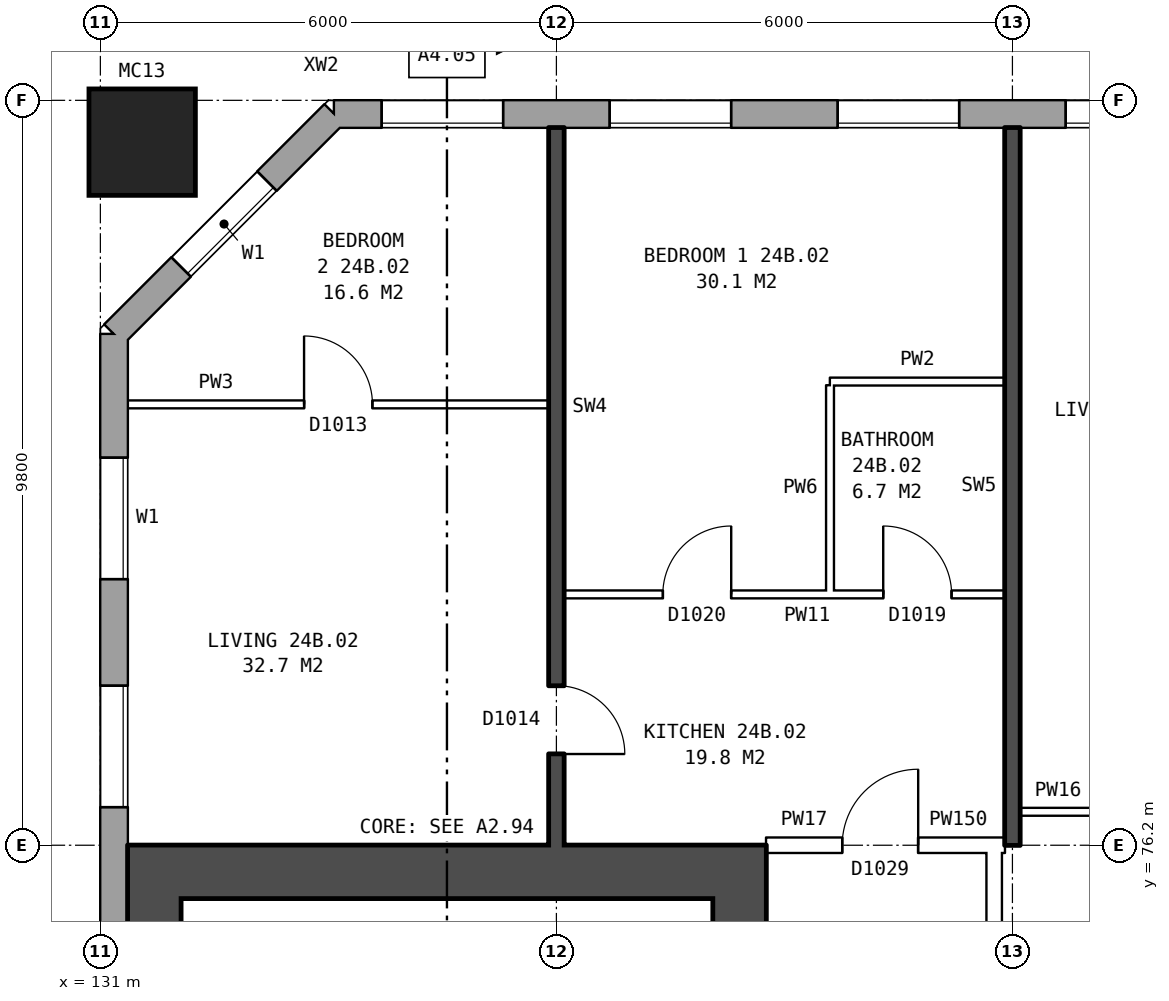
"""IFC4 building model, lengths in metres.
Left out: names, types, materials, properties, quantities, classifications, styles, units other than length and angle.
Written with IfcOpenShell. Run it as: python <this file> out.ifc"""

import sys

from ifc_helpers import new_model, si_unit, direction, frame, frame_2d, origin, origin_2d, place, context, subcontext, project, spatial, rectangle, hollow_rectangle, extrude, element, fill, save


model = new_model("IFC4")
c1 = context("Model", 3, precision=1e-05, world=origin(), true_north=direction((0.0, 1.0)))
c2 = subcontext(c1, "Body", "Model", "MODEL_VIEW")
j1 = project(units=[si_unit("LENGTHUNIT", "METRE"), si_unit("PLANEANGLEUNIT", "RADIAN")], contexts=[c1])
p1 = place(None, origin())
s1 = spatial("IfcSite", under=j1, at=p1, CompositionType="ELEMENT")
p2 = place(p1, origin())
s2 = spatial("IfcBuilding", under=s1, at=p2, CompositionType="ELEMENT")
p3 = place(p2, frame((0.0, 0.0, 87.1)))
s3 = spatial("IfcBuildingStorey", under=s2, at=p3, CompositionType="ELEMENT", Elevation=87.1)
p4 = place(p3, frame((131.55, 85.45, 0.0), z_axis=(0.0, 0.0, 1.0), x_axis=(1.0, 0.0, 0.0)))
e1 = element("IfcColumn", 1, at=p4, inside=s3, PredefinedType="COLUMN", context=c2, shape_type="SweptSolid", body=[
    extrude(hollow_rectangle(XDim=1.4, YDim=1.4, WallThickness=0.075, at=origin_2d()), origin(), (0.0, 0.0, 1.0), 3.1),
])
p5 = place(p3, frame((172.175, 85.82, 0.0), z_axis=(0.0, 0.0, 1.0), x_axis=(-1.0, 0.0, 0.0)))
e2 = element("IfcWall", 2, at=p5, inside=s3, PredefinedType="STANDARD", context=c2, shape_type="SweptSolid", body=[
    extrude(rectangle(XDim=38.101, YDim=0.36, at=frame_2d((19.05, 0.0))), origin(), (0.0, 0.0, 1.0), 2.85),
])
p6 = place(p5, frame((2.875, 0.0, 0.8)))
e3 = element("IfcOpeningElement", 3, at=p6, cuts=e2, PredefinedType="OPENING", context=c2, shape_type="SweptSolid", body=[
    extrude(rectangle(XDim=1.6, YDim=1.8, at=frame_2d((0.8, 0.9))), frame((0.0, 0.19, 0.0), z_axis=(0.0, -1.0, 0.0), x_axis=(1.0, 0.0, 0.0)), (0.0, 0.0, 1.0), 0.38),
])
p7 = place(p5, frame((5.875, 0.0, 0.8)))
e4 = element("IfcOpeningElement", 4, at=p7, cuts=e2, PredefinedType="OPENING", context=c2, shape_type="SweptSolid", body=[
    extrude(rectangle(XDim=1.6, YDim=1.8, at=frame_2d((0.8, 0.9))), frame((0.0, 0.19, 0.0), z_axis=(0.0, -1.0, 0.0), x_axis=(1.0, 0.0, 0.0)), (0.0, 0.0, 1.0), 0.38),
])
p8 = place(p5, frame((8.875, 0.0, 0.8)))
e5 = element("IfcOpeningElement", 5, at=p8, cuts=e2, PredefinedType="OPENING", context=c2, shape_type="SweptSolid", body=[
    extrude(rectangle(XDim=1.6, YDim=1.8, at=frame_2d((0.8, 0.9))), frame((0.0, 0.19, 0.0), z_axis=(0.0, -1.0, 0.0), x_axis=(1.0, 0.0, 0.0)), (0.0, 0.0, 1.0), 0.38),
])
p9 = place(p5, frame((11.875, 0.0, 0.8)))
e6 = element("IfcOpeningElement", 6, at=p9, cuts=e2, PredefinedType="OPENING", context=c2, shape_type="SweptSolid", body=[
    extrude(rectangle(XDim=1.6, YDim=1.8, at=frame_2d((0.8, 0.9))), frame((0.0, 0.19, 0.0), z_axis=(0.0, -1.0, 0.0), x_axis=(1.0, 0.0, 0.0)), (0.0, 0.0, 1.0), 0.38),
])
p10 = place(p5, frame((14.875, 0.0, 0.8)))
e7 = element("IfcOpeningElement", 7, at=p10, cuts=e2, PredefinedType="OPENING", context=c2, shape_type="SweptSolid", body=[
    extrude(rectangle(XDim=1.6, YDim=1.8, at=frame_2d((0.8, 0.9))), frame((0.0, 0.19, 0.0), z_axis=(0.0, -1.0, 0.0), x_axis=(1.0, 0.0, 0.0)), (0.0, 0.0, 1.0), 0.38),
])
p11 = place(p5, frame((18.325, 0.0, 0.15)))
e8 = element("IfcOpeningElement", 8, at=p11, cuts=e2, PredefinedType="OPENING", context=c2, shape_type="SweptSolid", body=[
    extrude(rectangle(XDim=1.4, YDim=1.2, at=frame_2d((0.7, 0.6))), frame((0.0, 0.19, 0.0), z_axis=(0.0, -1.0, 0.0), x_axis=(1.0, 0.0, 0.0)), (0.0, 0.0, 1.0), 0.38),
])
p12 = place(p5, frame((20.625, 0.0, 1.7)))
e9 = element("IfcOpeningElement", 9, at=p12, cuts=e2, PredefinedType="OPENING", context=c2, shape_type="SweptSolid", body=[
    extrude(rectangle(XDim=0.6, YDim=0.9, at=frame_2d((0.3, 0.45))), frame((0.0, 0.19, 0.0), z_axis=(0.0, -1.0, 0.0), x_axis=(1.0, 0.0, 0.0)), (0.0, 0.0, 1.0), 0.38),
])
p13 = place(p5, frame((23.875, 0.0, 0.8)))
e10 = element("IfcOpeningElement", 10, at=p13, cuts=e2, PredefinedType="OPENING", context=c2, shape_type="SweptSolid", body=[
    extrude(rectangle(XDim=1.6, YDim=1.8, at=frame_2d((0.8, 0.9))), frame((0.0, 0.19, 0.0), z_axis=(0.0, -1.0, 0.0), x_axis=(1.0, 0.0, 0.0)), (0.0, 0.0, 1.0), 0.38),
])
p14 = place(p5, frame((26.875, 0.0, 0.8)))
e11 = element("IfcOpeningElement", 11, at=p14, cuts=e2, PredefinedType="OPENING", context=c2, shape_type="SweptSolid", body=[
    extrude(rectangle(XDim=1.6, YDim=1.8, at=frame_2d((0.8, 0.9))), frame((0.0, 0.19, 0.0), z_axis=(0.0, -1.0, 0.0), x_axis=(1.0, 0.0, 0.0)), (0.0, 0.0, 1.0), 0.38),
])
p15 = place(p5, frame((29.875, 0.0, 0.8)))
e12 = element("IfcOpeningElement", 12, at=p15, cuts=e2, PredefinedType="OPENING", context=c2, shape_type="SweptSolid", body=[
    extrude(rectangle(XDim=1.6, YDim=1.8, at=frame_2d((0.8, 0.9))), frame((0.0, 0.19, 0.0), z_axis=(0.0, -1.0, 0.0), x_axis=(1.0, 0.0, 0.0)), (0.0, 0.0, 1.0), 0.38),
])
p16 = place(p5, frame((32.875, 0.0, 0.8)))
e13 = element("IfcOpeningElement", 13, at=p16, cuts=e2, PredefinedType="OPENING", context=c2, shape_type="SweptSolid", body=[
    extrude(rectangle(XDim=1.6, YDim=1.8, at=frame_2d((0.8, 0.9))), frame((0.0, 0.19, 0.0), z_axis=(0.0, -1.0, 0.0), x_axis=(1.0, 0.0, 0.0)), (0.0, 0.0, 1.0), 0.38),
])
p17 = place(p5, frame((35.875, 0.0, 0.8)))
e14 = element("IfcOpeningElement", 14, at=p17, cuts=e2, PredefinedType="OPENING", context=c2, shape_type="SweptSolid", body=[
    extrude(rectangle(XDim=1.6, YDim=1.8, at=frame_2d((0.8, 0.9))), frame((0.0, 0.19, 0.0), z_axis=(0.0, -1.0, 0.0), x_axis=(1.0, 0.0, 0.0)), (0.0, 0.0, 1.0), 0.38),
])
p18 = place(p5, frame((21.525, 0.0, 0.8)))
e15 = element("IfcOpeningElement", 15, at=p18, cuts=e2, PredefinedType="OPENING", context=c2, shape_type="SweptSolid", body=[
    extrude(rectangle(XDim=1.4, YDim=1.8, at=frame_2d((0.7, 0.9))), frame((0.0, 0.19, 0.0), z_axis=(0.0, -1.0, 0.0), x_axis=(1.0, 0.0, 0.0)), (0.0, 0.0, 1.0), 0.38),
])
p19 = place(p3, frame((134.075, 85.82, 0.0), z_axis=(0.0, 0.0, 1.0), x_axis=(-0.707106781187, -0.707106781187, 0.0)))
e16 = element("IfcWall", 16, at=p19, inside=s3, PredefinedType="STANDARD", context=c2, shape_type="SweptSolid", body=[
    extrude(rectangle(XDim=4.094, YDim=0.36, at=frame_2d((2.047, 0.0))), origin(), (0.0, 0.0, 1.0), 2.85),
])
p20 = place(p19, frame((1.247, 0.0, 0.8)))
e17 = element("IfcOpeningElement", 17, at=p20, cuts=e16, PredefinedType="OPENING", context=c2, shape_type="SweptSolid", body=[
    extrude(rectangle(XDim=1.6, YDim=1.8, at=frame_2d((0.8, 0.9))), frame((0.0, 0.19, 0.0), z_axis=(0.0, -1.0, 0.0), x_axis=(1.0, 0.0, 0.0)), (0.0, 0.0, 1.0), 0.38),
])
p21 = place(p3, frame((131.18, 82.925, 0.0), z_axis=(0.0, 0.0, 1.0), x_axis=(0.0, -1.0, 0.0)))
e18 = element("IfcWall", 18, at=p21, inside=s3, PredefinedType="STANDARD", context=c2, shape_type="SweptSolid", body=[
    extrude(rectangle(XDim=25.851, YDim=0.36, at=frame_2d((12.925, 0.0))), origin(), (0.0, 0.0, 1.0), 2.85),
])
p22 = place(p21, frame((1.625, 0.0, 0.8)))
e19 = element("IfcOpeningElement", 19, at=p22, cuts=e18, PredefinedType="OPENING", context=c2, shape_type="SweptSolid", body=[
    extrude(rectangle(XDim=1.6, YDim=1.8, at=frame_2d((0.8, 0.9))), frame((0.0, 0.19, 0.0), z_axis=(0.0, -1.0, 0.0), x_axis=(1.0, 0.0, 0.0)), (0.0, 0.0, 1.0), 0.38),
])
p23 = place(p21, frame((4.625, 0.0, 0.8)))
e20 = element("IfcOpeningElement", 20, at=p23, cuts=e18, PredefinedType="OPENING", context=c2, shape_type="SweptSolid", body=[
    extrude(rectangle(XDim=1.6, YDim=1.8, at=frame_2d((0.8, 0.9))), frame((0.0, 0.19, 0.0), z_axis=(0.0, -1.0, 0.0), x_axis=(1.0, 0.0, 0.0)), (0.0, 0.0, 1.0), 0.38),
])
p24 = place(p21, frame((19.625, 0.0, 0.8)))
e21 = element("IfcOpeningElement", 21, at=p24, cuts=e18, PredefinedType="OPENING", context=c2, shape_type="SweptSolid", body=[
    extrude(rectangle(XDim=1.6, YDim=1.8, at=frame_2d((0.8, 0.9))), frame((0.0, 0.19, 0.0), z_axis=(0.0, -1.0, 0.0), x_axis=(1.0, 0.0, 0.0)), (0.0, 0.0, 1.0), 0.38),
])
p25 = place(p21, frame((22.625, 0.0, 0.8)))
e22 = element("IfcOpeningElement", 22, at=p25, cuts=e18, PredefinedType="OPENING", context=c2, shape_type="SweptSolid", body=[
    extrude(rectangle(XDim=1.6, YDim=1.8, at=frame_2d((0.8, 0.9))), frame((0.0, 0.19, 0.0), z_axis=(0.0, -1.0, 0.0), x_axis=(1.0, 0.0, 0.0)), (0.0, 0.0, 1.0), 0.38),
])
p26 = place(p3, frame((139.41, 64.5, 0.0), z_axis=(0.0, 0.0, 1.0), x_axis=(0.0, 1.0, 0.0)))
e23 = element("IfcWall", 23, at=p26, inside=s3, PredefinedType="SHEAR", context=c2, shape_type="SweptSolid", body=[
    extrude(rectangle(XDim=11.0, YDim=0.7, at=frame_2d((5.5, 0.0))), origin(), (0.0, 0.0, 1.0), 2.85),
])
p27 = place(p26, frame((0.625, 0.0, 0.0)))
e24 = element("IfcOpeningElement", 24, at=p27, cuts=e23, PredefinedType="OPENING", context=c2, shape_type="SweptSolid", body=[
    extrude(rectangle(XDim=1.1, YDim=2.1, at=frame_2d((0.55, 1.05))), frame((0.0, 0.36, 0.0), z_axis=(0.0, -1.0, 0.0), x_axis=(1.0, 0.0, 0.0)), (0.0, 0.0, 1.0), 0.72),
])
p28 = place(p26, frame((9.2, 0.0, 0.0)))
e25 = element("IfcOpeningElement", 25, at=p28, cuts=e23, PredefinedType="OPENING", context=c2, shape_type="SweptSolid", body=[
    extrude(rectangle(XDim=1.1, YDim=2.1, at=frame_2d((0.55, 1.05))), frame((0.0, 0.36, 0.0), z_axis=(0.0, -1.0, 0.0), x_axis=(1.0, 0.0, 0.0)), (0.0, 0.0, 1.0), 0.72),
])
p29 = place(p26, frame((7.425, 0.0, 0.0)))
e26 = element("IfcOpeningElement", 26, at=p29, cuts=e23, PredefinedType="OPENING", context=c2, shape_type="SweptSolid", body=[
    extrude(rectangle(XDim=0.85, YDim=2.1, at=frame_2d((0.425, 1.05))), frame((0.0, 0.36, 0.0), z_axis=(0.0, -1.0, 0.0), x_axis=(1.0, 0.0, 0.0)), (0.0, 0.0, 1.0), 0.72),
])
p30 = place(p3, frame((131.71, 64.5, 0.0), z_axis=(0.0, 0.0, 1.0), x_axis=(0.0, 1.0, 0.0)))
e27 = element("IfcWall", 27, at=p30, inside=s3, PredefinedType="SHEAR", context=c2, shape_type="SweptSolid", body=[
    extrude(rectangle(XDim=11.0, YDim=0.7, at=frame_2d((5.5, 0.0))), origin(), (0.0, 0.0, 1.0), 2.85),
])
p31 = place(p3, frame((139.76, 75.85, 0.0), z_axis=(0.0, 0.0, 1.0), x_axis=(-1.0, 0.0, 0.0)))
e28 = element("IfcWall", 28, at=p31, inside=s3, PredefinedType="SHEAR", context=c2, shape_type="SweptSolid", body=[
    extrude(rectangle(XDim=8.4, YDim=0.7, at=frame_2d((4.2, 0.0))), origin(), (0.0, 0.0, 1.0), 2.85),
])
p32 = place(p3, frame((142.76, 63.9, 0.0), z_axis=(0.0, 0.0, 1.0), x_axis=(0.0, 1.0, 0.0)))
e29 = element("IfcWall", 29, at=p32, inside=s3, PredefinedType="PARTITIONING", context=c2, shape_type="SweptSolid", body=[
    extrude(rectangle(XDim=12.2, YDim=0.2, at=frame_2d((6.1, 0.0))), origin(), (0.0, 0.0, 1.0), 2.85),
])
p33 = place(p32, frame((5.1, 0.0, 0.0)))
e30 = element("IfcOpeningElement", 30, at=p33, cuts=e29, PredefinedType="OPENING", context=c2, shape_type="SweptSolid", body=[
    extrude(rectangle(XDim=2.0, YDim=2.1, at=frame_2d((1.0, 1.05))), frame((0.0, 0.11, 0.0), z_axis=(0.0, -1.0, 0.0), x_axis=(1.0, 0.0, 0.0)), (0.0, 0.0, 1.0), 0.22),
])
p34 = place(p3, frame((139.76, 76.2, 0.0), z_axis=(0.0, 0.0, 1.0), x_axis=(1.0, 0.0, 0.0)))
e31 = element("IfcWall", 31, at=p34, inside=s3, PredefinedType="PARTITIONING", context=c2, shape_type="SweptSolid", body=[
    extrude(rectangle(XDim=3.0, YDim=0.2, at=frame_2d((1.5, 0.0))), origin(), (0.0, 0.0, 1.0), 2.85),
])
p35 = place(p34, frame((1.0, 0.0, 0.0)))
e32 = element("IfcOpeningElement", 32, at=p35, cuts=e31, PredefinedType="OPENING", context=c2, shape_type="SweptSolid", body=[
    extrude(rectangle(XDim=1.0, YDim=2.1, at=frame_2d((0.5, 1.05))), frame((0.0, 0.11, 0.0), z_axis=(0.0, -1.0, 0.0), x_axis=(1.0, 0.0, 0.0)), (0.0, 0.0, 1.0), 0.22),
])
p36 = place(p3, frame((142.76, 76.2, 0.0), z_axis=(0.0, 0.0, 1.0), x_axis=(1.0, 0.0, 0.0)))
e33 = element("IfcWall", 33, at=p36, inside=s3, PredefinedType="PARTITIONING", context=c2, shape_type="SweptSolid", body=[
    extrude(rectangle(XDim=0.14, YDim=0.2, at=frame_2d((0.07, 0.0))), origin(), (0.0, 0.0, 1.0), 2.85),
])
p37 = place(p3, frame((143.1, 76.64, 0.0), z_axis=(0.0, 0.0, 1.0), x_axis=(1.0, 0.0, 0.0)))
e34 = element("IfcWall", 34, at=p37, inside=s3, PredefinedType="PARTITIONING", context=c2, shape_type="SweptSolid", body=[
    extrude(rectangle(XDim=2.9, YDim=0.1, at=frame_2d((1.45, 0.0))), origin(), (0.0, 0.0, 1.0), 2.85),
])
p38 = place(p37, frame((1.0, 0.0, 0.0)))
e35 = element("IfcOpeningElement", 35, at=p38, cuts=e34, PredefinedType="OPENING", context=c2, shape_type="SweptSolid", body=[
    extrude(rectangle(XDim=0.9, YDim=2.1, at=frame_2d((0.45, 1.05))), frame((0.0, 0.06, 0.0), z_axis=(0.0, -1.0, 0.0), x_axis=(1.0, 0.0, 0.0)), (0.0, 0.0, 1.0), 0.12),
])
p39 = place(p3, frame((137.1, 79.5, 0.0), z_axis=(0.0, 0.0, 1.0), x_axis=(1.0, 0.0, 0.0)))
e36 = element("IfcWall", 36, at=p39, inside=s3, PredefinedType="PARTITIONING", context=c2, shape_type="SweptSolid", body=[
    extrude(rectangle(XDim=5.8, YDim=0.1, at=frame_2d((2.9, 0.0))), origin(), (0.0, 0.0, 1.0), 2.85),
])
p40 = place(p39, frame((1.3, 0.0, 0.0)))
e37 = element("IfcOpeningElement", 37, at=p40, cuts=e36, PredefinedType="OPENING", context=c2, shape_type="SweptSolid", body=[
    extrude(rectangle(XDim=0.9, YDim=2.1, at=frame_2d((0.45, 1.05))), frame((0.0, 0.06, 0.0), z_axis=(0.0, -1.0, 0.0), x_axis=(1.0, 0.0, 0.0)), (0.0, 0.0, 1.0), 0.12),
])
p41 = place(p39, frame((4.2, 0.0, 0.0)))
e38 = element("IfcOpeningElement", 38, at=p41, cuts=e36, PredefinedType="OPENING", context=c2, shape_type="SweptSolid", body=[
    extrude(rectangle(XDim=0.9, YDim=2.1, at=frame_2d((0.45, 1.05))), frame((0.0, 0.06, 0.0), z_axis=(0.0, -1.0, 0.0), x_axis=(1.0, 0.0, 0.0)), (0.0, 0.0, 1.0), 0.12),
])
p42 = place(p3, frame((131.36, 82.0, 0.0), z_axis=(0.0, 0.0, 1.0), x_axis=(1.0, 0.0, 0.0)))
e39 = element("IfcWall", 39, at=p42, inside=s3, PredefinedType="PARTITIONING", context=c2, shape_type="SweptSolid", body=[
    extrude(rectangle(XDim=5.54, YDim=0.1, at=frame_2d((2.77, 0.0))), origin(), (0.0, 0.0, 1.0), 2.85),
])
p43 = place(p42, frame((2.32, 0.0, 0.0)))
e40 = element("IfcOpeningElement", 40, at=p43, cuts=e39, PredefinedType="OPENING", context=c2, shape_type="SweptSolid", body=[
    extrude(rectangle(XDim=0.9, YDim=2.1, at=frame_2d((0.45, 1.05))), frame((0.0, 0.06, 0.0), z_axis=(0.0, -1.0, 0.0), x_axis=(1.0, 0.0, 0.0)), (0.0, 0.0, 1.0), 0.12),
])
p44 = place(p3, frame((140.6, 82.3, 0.0), z_axis=(0.0, 0.0, 1.0), x_axis=(1.0, 0.0, 0.0)))
e41 = element("IfcWall", 41, at=p44, inside=s3, PredefinedType="PARTITIONING", context=c2, shape_type="SweptSolid", body=[
    extrude(rectangle(XDim=2.3, YDim=0.1, at=frame_2d((1.15, 0.0))), origin(), (0.0, 0.0, 1.0), 2.85),
])
p45 = place(p3, frame((137.0, 76.2, 0.0), z_axis=(0.0, 0.0, 1.0), x_axis=(0.0, 1.0, 0.0)))
e42 = element("IfcWall", 42, at=p45, inside=s3, PredefinedType="SOLIDWALL", context=c2, shape_type="SweptSolid", body=[
    extrude(rectangle(XDim=9.44, YDim=0.2, at=frame_2d((4.72, 0.0))), origin(), (0.0, 0.0, 1.0), 2.85),
])
p46 = place(p45, frame((1.2, 0.0, 0.0)))
e43 = element("IfcOpeningElement", 43, at=p46, cuts=e42, PredefinedType="OPENING", context=c2, shape_type="SweptSolid", body=[
    extrude(rectangle(XDim=0.9, YDim=2.1, at=frame_2d((0.45, 1.05))), frame((0.0, 0.11, 0.0), z_axis=(0.0, -1.0, 0.0), x_axis=(1.0, 0.0, 0.0)), (0.0, 0.0, 1.0), 0.22),
])
p47 = place(p3, frame((140.6, 79.55, 0.0), z_axis=(0.0, 0.0, 1.0), x_axis=(0.0, 1.0, 0.0)))
e44 = element("IfcWall", 44, at=p47, inside=s3, PredefinedType="PARTITIONING", context=c2, shape_type="SweptSolid", body=[
    extrude(rectangle(XDim=2.7, YDim=0.1, at=frame_2d((1.35, 0.0))), origin(), (0.0, 0.0, 1.0), 2.85),
])
p48 = place(p3, frame((143.0, 76.2, 0.0), z_axis=(0.0, 0.0, 1.0), x_axis=(0.0, 1.0, 0.0)))
e45 = element("IfcWall", 45, at=p48, inside=s3, PredefinedType="SOLIDWALL", context=c2, shape_type="SweptSolid", body=[
    extrude(rectangle(XDim=9.44, YDim=0.2, at=frame_2d((4.72, 0.0))), origin(), (0.0, 0.0, 1.0), 2.85),
])
p49 = place(p14, origin())
e46 = element("IfcWindow", 46, at=p49, inside=s3, PartitioningType="SINGLE_PANEL", PredefinedType="WINDOW", context=c2, shape_type="SweptSolid", body=[
    extrude(rectangle(XDim=1.6, YDim=1.8, at=frame_2d((0.8, 0.9))), frame((0.0, 0.15, 0.0), z_axis=(0.0, -1.0, 0.0), x_axis=(1.0, 0.0, 0.0)), (0.0, 0.0, 1.0), 0.06),
])
fill(e11, e46)
p50 = place(p15, origin())
e47 = element("IfcWindow", 47, at=p50, inside=s3, PartitioningType="SINGLE_PANEL", PredefinedType="WINDOW", context=c2, shape_type="SweptSolid", body=[
    extrude(rectangle(XDim=1.6, YDim=1.8, at=frame_2d((0.8, 0.9))), frame((0.0, 0.15, 0.0), z_axis=(0.0, -1.0, 0.0), x_axis=(1.0, 0.0, 0.0)), (0.0, 0.0, 1.0), 0.06),
])
fill(e12, e47)
p51 = place(p16, origin())
e48 = element("IfcWindow", 48, at=p51, inside=s3, PartitioningType="SINGLE_PANEL", PredefinedType="WINDOW", context=c2, shape_type="SweptSolid", body=[
    extrude(rectangle(XDim=1.6, YDim=1.8, at=frame_2d((0.8, 0.9))), frame((0.0, 0.15, 0.0), z_axis=(0.0, -1.0, 0.0), x_axis=(1.0, 0.0, 0.0)), (0.0, 0.0, 1.0), 0.06),
])
fill(e13, e48)
p52 = place(p17, origin())
e49 = element("IfcWindow", 49, at=p52, inside=s3, PartitioningType="SINGLE_PANEL", PredefinedType="WINDOW", context=c2, shape_type="SweptSolid", body=[
    extrude(rectangle(XDim=1.6, YDim=1.8, at=frame_2d((0.8, 0.9))), frame((0.0, 0.15, 0.0), z_axis=(0.0, -1.0, 0.0), x_axis=(1.0, 0.0, 0.0)), (0.0, 0.0, 1.0), 0.06),
])
fill(e14, e49)
p53 = place(p20, origin())
e50 = element("IfcWindow", 50, at=p53, inside=s3, PartitioningType="SINGLE_PANEL", PredefinedType="WINDOW", context=c2, shape_type="SweptSolid", body=[
    extrude(rectangle(XDim=1.6, YDim=1.8, at=frame_2d((0.8, 0.9))), frame((0.0, 0.15, 0.0), z_axis=(0.0, -1.0, 0.0), x_axis=(1.0, 0.0, 0.0)), (0.0, 0.0, 1.0), 0.06),
])
fill(e17, e50)
p54 = place(p22, origin())
e51 = element("IfcWindow", 51, at=p54, inside=s3, PartitioningType="SINGLE_PANEL", PredefinedType="WINDOW", context=c2, shape_type="SweptSolid", body=[
    extrude(rectangle(XDim=1.6, YDim=1.8, at=frame_2d((0.8, 0.9))), frame((0.0, 0.15, 0.0), z_axis=(0.0, -1.0, 0.0), x_axis=(1.0, 0.0, 0.0)), (0.0, 0.0, 1.0), 0.06),
])
fill(e19, e51)
p55 = place(p23, origin())
e52 = element("IfcWindow", 52, at=p55, inside=s3, PartitioningType="SINGLE_PANEL", PredefinedType="WINDOW", context=c2, shape_type="SweptSolid", body=[
    extrude(rectangle(XDim=1.6, YDim=1.8, at=frame_2d((0.8, 0.9))), frame((0.0, 0.15, 0.0), z_axis=(0.0, -1.0, 0.0), x_axis=(1.0, 0.0, 0.0)), (0.0, 0.0, 1.0), 0.06),
])
fill(e20, e52)
p56 = place(p40, origin())
e53 = element("IfcDoor", 53, at=p56, inside=s3, OperationType="SINGLE_SWING_RIGHT", PredefinedType="DOOR", context=c2, shape_type="SweptSolid", body=[
    extrude(rectangle(XDim=0.9, YDim=2.1, at=frame_2d((0.45, 1.05))), frame((0.0, 0.025, 0.0), z_axis=(0.0, -1.0, 0.0), x_axis=(1.0, 0.0, 0.0)), (0.0, 0.0, 1.0), 0.05),
])
fill(e37, e53)
p57 = place(p43, origin())
e54 = element("IfcDoor", 54, at=p57, inside=s3, OperationType="SINGLE_SWING_LEFT", PredefinedType="DOOR", context=c2, shape_type="SweptSolid", body=[
    extrude(rectangle(XDim=0.9, YDim=2.1, at=frame_2d((0.45, 1.05))), frame((0.0, 0.025, 0.0), z_axis=(0.0, -1.0, 0.0), x_axis=(1.0, 0.0, 0.0)), (0.0, 0.0, 1.0), 0.05),
])
fill(e40, e54)
p58 = place(p35, origin())
e55 = element("IfcDoor", 55, at=p58, inside=s3, OperationType="SINGLE_SWING_RIGHT", PredefinedType="DOOR", context=c2, shape_type="SweptSolid", body=[
    extrude(rectangle(XDim=1.0, YDim=2.1, at=frame_2d((0.5, 1.05))), frame((0.0, 0.025, 0.0), z_axis=(0.0, -1.0, 0.0), x_axis=(1.0, 0.0, 0.0)), (0.0, 0.0, 1.0), 0.05),
])
fill(e32, e55)
p59 = place(p46, frame((0.9, 0.0, 0.0), z_axis=(0.0, 0.0, 1.0), x_axis=(-1.0, 0.0, 0.0)))
e56 = element("IfcDoor", 56, at=p59, inside=s3, OperationType="SINGLE_SWING_RIGHT", PredefinedType="DOOR", context=c2, shape_type="SweptSolid", body=[
    extrude(rectangle(XDim=0.9, YDim=2.1, at=frame_2d((0.45, 1.05))), frame((0.0, 0.025, 0.0), z_axis=(0.0, -1.0, 0.0), x_axis=(1.0, 0.0, 0.0)), (0.0, 0.0, 1.0), 0.05),
])
fill(e43, e56)
p60 = place(p41, origin())
e57 = element("IfcDoor", 57, at=p60, inside=s3, OperationType="SINGLE_SWING_LEFT", PredefinedType="DOOR", context=c2, shape_type="SweptSolid", body=[
    extrude(rectangle(XDim=0.9, YDim=2.1, at=frame_2d((0.45, 1.05))), frame((0.0, 0.025, 0.0), z_axis=(0.0, -1.0, 0.0), x_axis=(1.0, 0.0, 0.0)), (0.0, 0.0, 1.0), 0.05),
])
fill(e38, e57)
save(model, sys.argv[1])
